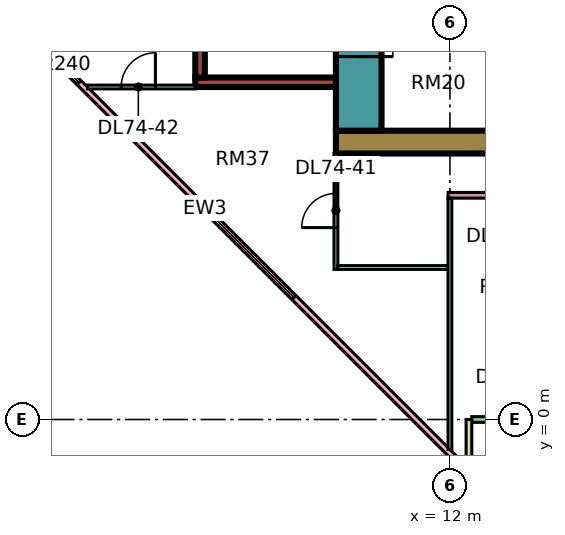
"""IFC4 building model, lengths in metres.
Left out: names, types, materials, properties, quantities, classifications, styles, units other than length and angle.
Written with IfcOpenShell. Run it as: python <this file> out.ifc"""

import sys

from ifc_helpers import new_model, si_unit, direction, frame, frame_2d, origin, place, context, subcontext, project, spatial, rectangle, extrude, element, fill, save


model = new_model("IFC4")
c1 = context("Model", 3, precision=1e-05, world=origin(), true_north=direction((0.0, 1.0)))
c2 = subcontext(c1, "Body", "Model", "MODEL_VIEW")
j1 = project(units=[si_unit("LENGTHUNIT", "METRE"), si_unit("PLANEANGLEUNIT", "RADIAN")], contexts=[c1])
p1 = place(None, origin())
s1 = spatial("IfcSite", under=j1, at=p1, CompositionType="ELEMENT")
p2 = place(p1, origin())
s2 = spatial("IfcBuilding", under=s1, at=p2, CompositionType="ELEMENT")
p3 = place(p2, frame((0.0, 0.0, 314.65)))
s3 = spatial("IfcBuildingStorey", under=s2, at=p3, CompositionType="ELEMENT", Elevation=314.65)
p4 = place(p3, frame((9.0, 7.3, 0.0), z_axis=(0.0, 0.0, 1.0), x_axis=(1.0, 0.0, 0.0)))
e1 = element("IfcWall", 1, at=p4, inside=s3, PredefinedType="SHEAR", context=c2, shape_type="SweptSolid", body=[
    extrude(rectangle(XDim=25.0, YDim=0.6, at=frame_2d((12.5, 0.0))), origin(), (0.0, 0.0, 1.0), 3.75),
])
p5 = place(p3, frame((9.6, 7.6, 0.0), z_axis=(0.0, 0.0, 1.0), x_axis=(0.0, 1.0, 0.0)))
e2 = element("IfcWall", 2, at=p5, inside=s3, PredefinedType="SHEAR", context=c2, shape_type="SweptSolid", body=[
    extrude(rectangle(XDim=11.8, YDim=1.2, at=frame_2d((5.9, 0.0))), origin(), (0.0, 0.0, 1.0), 3.75),
])
p6 = place(p5, frame((4.275, 0.0, 0.0)))
e3 = element("IfcOpeningElement", 3, at=p6, cuts=e2, PredefinedType="OPENING", context=c2, shape_type="SweptSolid", body=[
    extrude(rectangle(XDim=1.1, YDim=2.2, at=frame_2d((0.55, 1.1))), frame((0.0, 0.61, 0.0), z_axis=(0.0, -1.0, 0.0), x_axis=(1.0, 0.0, 0.0)), (0.0, 0.0, 1.0), 1.22),
])
p7 = place(p5, frame((6.775, 0.0, 0.0)))
e4 = element("IfcOpeningElement", 4, at=p7, cuts=e2, PredefinedType="OPENING", context=c2, shape_type="SweptSolid", body=[
    extrude(rectangle(XDim=1.1, YDim=2.2, at=frame_2d((0.55, 1.1))), frame((0.0, 0.61, 0.0), z_axis=(0.0, -1.0, 0.0), x_axis=(1.0, 0.0, 0.0)), (0.0, 0.0, 1.0), 1.22),
])
p8 = place(p5, frame((9.7, 0.0, 0.0)))
e5 = element("IfcOpeningElement", 5, at=p8, cuts=e2, PredefinedType="OPENING", context=c2, shape_type="SweptSolid", body=[
    extrude(rectangle(XDim=1.1, YDim=2.2, at=frame_2d((0.55, 1.1))), frame((0.0, 0.61, 0.0), z_axis=(0.0, -1.0, 0.0), x_axis=(1.0, 0.0, 0.0)), (0.0, 0.0, 1.0), 1.22),
])
p9 = place(p5, frame((1.95, 0.0, 0.0)))
e6 = element("IfcOpeningElement", 6, at=p9, cuts=e2, PredefinedType="OPENING", context=c2, shape_type="SweptSolid", body=[
    extrude(rectangle(XDim=0.9, YDim=2.1, at=frame_2d((0.45, 1.05))), frame((0.0, 0.61, 0.0), z_axis=(0.0, -1.0, 0.0), x_axis=(1.0, 0.0, 0.0)), (0.0, 0.0, 1.0), 1.22),
])
p10 = place(p3, frame((5.3, 8.875, 0.0), z_axis=(0.0, 0.0, 1.0), x_axis=(1.0, 0.0, 0.0)))
e7 = element("IfcWall", 7, at=p10, inside=s3, PredefinedType="SHEAR", context=c2, shape_type="SweptSolid", body=[
    extrude(rectangle(XDim=3.7, YDim=0.25, at=frame_2d((1.85, 0.0))), origin(), (0.0, 0.0, 1.0), 3.75),
])
p11 = place(p3, frame((5.425, 9.0, 0.0), z_axis=(0.0, 0.0, 1.0), x_axis=(0.0, 1.0, 0.0)))
e8 = element("IfcWall", 8, at=p11, inside=s3, PredefinedType="SHEAR", context=c2, shape_type="SweptSolid", body=[
    extrude(rectangle(XDim=4.0, YDim=0.25, at=frame_2d((2.0, 0.0))), origin(), (0.0, 0.0, 1.0), 3.75),
])
p12 = place(p3, frame((-1.447, 12.553, 0.0), z_axis=(0.0, 0.0, 1.0), x_axis=(0.707106781187, -0.707106781187, 0.0)))
e9 = element("IfcWall", 9, at=p12, inside=s3, PredefinedType="SOLIDWALL", context=c2, shape_type="SweptSolid", body=[
    extrude(rectangle(XDim=19.799, YDim=0.15, at=frame_2d((9.899, 0.0))), origin(), (0.0, 0.0, 1.0), 3.35),
])
p13 = place(p12, frame((2.212, 0.0, 0.45)))
e10 = element("IfcOpeningElement", 10, at=p13, cuts=e9, PredefinedType="OPENING", context=c2, shape_type="SweptSolid", body=[
    extrude(rectangle(XDim=3.0, YDim=2.4, at=frame_2d((1.5, 1.2))), frame((0.0, 0.085, 0.0), z_axis=(0.0, -1.0, 0.0), x_axis=(1.0, 0.0, 0.0)), (0.0, 0.0, 1.0), 0.17),
])
p14 = place(p12, frame((10.216, 0.0, 0.45)))
e11 = element("IfcOpeningElement", 11, at=p14, cuts=e9, PredefinedType="OPENING", context=c2, shape_type="SweptSolid", body=[
    extrude(rectangle(XDim=3.0, YDim=2.4, at=frame_2d((1.5, 1.2))), frame((0.0, 0.085, 0.0), z_axis=(0.0, -1.0, 0.0), x_axis=(1.0, 0.0, 0.0)), (0.0, 0.0, 1.0), 0.17),
])
p15 = place(p3, frame((12.575, 0.0, 0.0), z_axis=(0.0, 0.0, 1.0), x_axis=(1.0, 0.0, 0.0)))
e12 = element("IfcWall", 12, at=p15, inside=s3, PredefinedType="SOLIDWALL", context=c2, shape_type="SweptSolid", body=[
    extrude(rectangle(XDim=11.35, YDim=0.15, at=frame_2d((5.675, 0.0))), origin(), (0.0, 0.0, 1.0), 3.35),
])
p16 = place(p15, frame((0.613, 0.0, 0.0)))
e13 = element("IfcOpeningElement", 13, at=p16, cuts=e12, PredefinedType="OPENING", context=c2, shape_type="SweptSolid", body=[
    extrude(rectangle(XDim=1.2, YDim=2.4, at=frame_2d((0.6, 1.2))), frame((0.0, 0.085, 0.0), z_axis=(0.0, -1.0, 0.0), x_axis=(1.0, 0.0, 0.0)), (0.0, 0.0, 1.0), 0.17),
])
p17 = place(p15, frame((3.025, 0.0, 0.45)))
e14 = element("IfcOpeningElement", 14, at=p17, cuts=e12, PredefinedType="OPENING", context=c2, shape_type="SweptSolid", body=[
    extrude(rectangle(XDim=1.8, YDim=2.4, at=frame_2d((0.9, 1.2))), frame((0.0, 0.085, 0.0), z_axis=(0.0, -1.0, 0.0), x_axis=(1.0, 0.0, 0.0)), (0.0, 0.0, 1.0), 0.17),
])
p18 = place(p15, frame((6.675, 0.0, 0.45)))
e15 = element("IfcOpeningElement", 15, at=p18, cuts=e12, PredefinedType="OPENING", context=c2, shape_type="SweptSolid", body=[
    extrude(rectangle(XDim=3.0, YDim=2.4, at=frame_2d((1.5, 1.2))), frame((0.0, 0.085, 0.0), z_axis=(0.0, -1.0, 0.0), x_axis=(1.0, 0.0, 0.0)), (0.0, 0.0, 1.0), 0.17),
])
p19 = place(p3, frame((12.5, -1.5, 0.0), z_axis=(0.0, 0.0, 1.0), x_axis=(0.0, 1.0, 0.0)))
e16 = element("IfcWall", 16, at=p19, inside=s3, PredefinedType="SOLIDWALL", context=c2, shape_type="SweptSolid", body=[
    extrude(rectangle(XDim=1.5, YDim=0.15, at=frame_2d((0.75, 0.0))), origin(), (0.0, 0.0, 1.0), 3.35),
])
p20 = place(p3, frame((2.461, 8.75, 0.0), z_axis=(0.0, 0.0, 1.0), x_axis=(1.0, 0.0, 0.0)))
e17 = element("IfcWall", 17, at=p20, inside=s3, PredefinedType="PARTITIONING", context=c2, shape_type="SweptSolid", body=[
    extrude(rectangle(XDim=2.839, YDim=0.1, at=frame_2d((1.419, 0.0))), origin(), (0.0, 0.0, 1.0), 3.35),
])
p21 = place(p20, frame((0.889, 0.0, 0.0)))
e18 = element("IfcOpeningElement", 18, at=p21, cuts=e17, PredefinedType="OPENING", context=c2, shape_type="SweptSolid", body=[
    extrude(rectangle(XDim=0.9, YDim=2.1, at=frame_2d((0.45, 1.05))), frame((0.0, 0.06, 0.0), z_axis=(0.0, -1.0, 0.0), x_axis=(1.0, 0.0, 0.0)), (0.0, 0.0, 1.0), 0.12),
])
p22 = place(p3, frame((9.0, 3.95, 0.0), z_axis=(0.0, 0.0, 1.0), x_axis=(0.0, 1.0, 0.0)))
e19 = element("IfcWall", 19, at=p22, inside=s3, PredefinedType="PARTITIONING", context=c2, shape_type="SweptSolid", body=[
    extrude(rectangle(XDim=3.05, YDim=0.1, at=frame_2d((1.525, 0.0))), origin(), (0.0, 0.0, 1.0), 3.35),
])
p23 = place(p22, frame((1.1, 0.0, 0.0)))
e20 = element("IfcOpeningElement", 20, at=p23, cuts=e19, PredefinedType="OPENING", context=c2, shape_type="SweptSolid", body=[
    extrude(rectangle(XDim=0.9, YDim=2.1, at=frame_2d((0.45, 1.05))), frame((0.0, 0.06, 0.0), z_axis=(0.0, -1.0, 0.0), x_axis=(1.0, 0.0, 0.0)), (0.0, 0.0, 1.0), 0.12),
])
p24 = place(p3, frame((9.05, 4.0, 0.0), z_axis=(0.0, 0.0, 1.0), x_axis=(1.0, 0.0, 0.0)))
e21 = element("IfcWall", 21, at=p24, inside=s3, PredefinedType="PARTITIONING", context=c2, shape_type="SweptSolid", body=[
    extrude(rectangle(XDim=2.9, YDim=0.1, at=frame_2d((1.45, 0.0))), origin(), (0.0, 0.0, 1.0), 3.35),
])
p25 = place(p3, frame((11.95, 5.9, 0.0), z_axis=(0.0, 0.0, 1.0), x_axis=(1.0, 0.0, 0.0)))
e22 = element("IfcWall", 22, at=p25, inside=s3, PredefinedType="PARTITIONING", context=c2, shape_type="SweptSolid", body=[
    extrude(rectangle(XDim=21.1, YDim=0.15, at=frame_2d((10.55, 0.0))), origin(), (0.0, 0.0, 1.0), 3.35),
])
p26 = place(p25, frame((1.1, 0.0, 0.0)))
e23 = element("IfcOpeningElement", 23, at=p26, cuts=e22, PredefinedType="OPENING", context=c2, shape_type="SweptSolid", body=[
    extrude(rectangle(XDim=0.9, YDim=2.1, at=frame_2d((0.45, 1.05))), frame((0.0, 0.085, 0.0), z_axis=(0.0, -1.0, 0.0), x_axis=(1.0, 0.0, 0.0)), (0.0, 0.0, 1.0), 0.17),
])
p27 = place(p25, frame((4.1, 0.0, 0.0)))
e24 = element("IfcOpeningElement", 24, at=p27, cuts=e22, PredefinedType="OPENING", context=c2, shape_type="SweptSolid", body=[
    extrude(rectangle(XDim=0.9, YDim=2.1, at=frame_2d((0.45, 1.05))), frame((0.0, 0.085, 0.0), z_axis=(0.0, -1.0, 0.0), x_axis=(1.0, 0.0, 0.0)), (0.0, 0.0, 1.0), 0.17),
])
p28 = place(p25, frame((10.1, 0.0, 0.0)))
e25 = element("IfcOpeningElement", 25, at=p28, cuts=e22, PredefinedType="OPENING", context=c2, shape_type="SweptSolid", body=[
    extrude(rectangle(XDim=0.9, YDim=2.1, at=frame_2d((0.45, 1.05))), frame((0.0, 0.085, 0.0), z_axis=(0.0, -1.0, 0.0), x_axis=(1.0, 0.0, 0.0)), (0.0, 0.0, 1.0), 0.17),
])
p29 = place(p25, frame((16.1, 0.0, 0.0)))
e26 = element("IfcOpeningElement", 26, at=p29, cuts=e22, PredefinedType="OPENING", context=c2, shape_type="SweptSolid", body=[
    extrude(rectangle(XDim=0.9, YDim=2.1, at=frame_2d((0.45, 1.05))), frame((0.0, 0.085, 0.0), z_axis=(0.0, -1.0, 0.0), x_axis=(1.0, 0.0, 0.0)), (0.0, 0.0, 1.0), 0.17),
])
p30 = place(p3, frame((12.0, -0.788, 0.0), z_axis=(0.0, 0.0, 1.0), x_axis=(0.0, 1.0, 0.0)))
e27 = element("IfcWall", 27, at=p30, inside=s3, PredefinedType="PARTITIONING", context=c2, shape_type="SweptSolid", body=[
    extrude(rectangle(XDim=6.613, YDim=0.1, at=frame_2d((3.306, 0.0))), origin(), (0.0, 0.0, 1.0), 3.35),
])
p31 = place(p13, origin())
e28 = element("IfcWindow", 28, at=p31, inside=s3, PartitioningType="SINGLE_PANEL", PredefinedType="WINDOW", context=c2, shape_type="SweptSolid", body=[
    extrude(rectangle(XDim=3.0, YDim=2.4, at=frame_2d((1.5, 1.2))), frame((0.0, 0.03, 0.0), z_axis=(0.0, -1.0, 0.0), x_axis=(1.0, 0.0, 0.0)), (0.0, 0.0, 1.0), 0.06),
])
fill(e10, e28)
p32 = place(p14, origin())
e29 = element("IfcWindow", 29, at=p32, inside=s3, PartitioningType="SINGLE_PANEL", PredefinedType="WINDOW", context=c2, shape_type="SweptSolid", body=[
    extrude(rectangle(XDim=3.0, YDim=2.4, at=frame_2d((1.5, 1.2))), frame((0.0, 0.03, 0.0), z_axis=(0.0, -1.0, 0.0), x_axis=(1.0, 0.0, 0.0)), (0.0, 0.0, 1.0), 0.06),
])
fill(e11, e29)
p33 = place(p9, frame((0.9, 0.0, 0.0), z_axis=(0.0, 0.0, 1.0), x_axis=(-1.0, 0.0, 0.0)))
e30 = element("IfcDoor", 30, at=p33, inside=s3, OperationType="SINGLE_SWING_LEFT", PredefinedType="DOOR", context=c2, shape_type="SweptSolid", body=[
    extrude(rectangle(XDim=0.9, YDim=2.1, at=frame_2d((0.45, 1.05))), frame((0.0, 0.025, 0.0), z_axis=(0.0, -1.0, 0.0), x_axis=(1.0, 0.0, 0.0)), (0.0, 0.0, 1.0), 0.05),
])
fill(e6, e30)
p34 = place(p23, origin())
e31 = element("IfcDoor", 31, at=p34, inside=s3, OperationType="SINGLE_SWING_LEFT", PredefinedType="DOOR", context=c2, shape_type="SweptSolid", body=[
    extrude(rectangle(XDim=0.9, YDim=2.1, at=frame_2d((0.45, 1.05))), frame((0.0, 0.025, 0.0), z_axis=(0.0, -1.0, 0.0), x_axis=(1.0, 0.0, 0.0)), (0.0, 0.0, 1.0), 0.05),
])
fill(e20, e31)
p35 = place(p21, frame((0.9, 0.0, 0.0), z_axis=(0.0, 0.0, 1.0), x_axis=(-1.0, 0.0, 0.0)))
e32 = element("IfcDoor", 32, at=p35, inside=s3, OperationType="SINGLE_SWING_RIGHT", PredefinedType="DOOR", context=c2, shape_type="SweptSolid", body=[
    extrude(rectangle(XDim=0.9, YDim=2.1, at=frame_2d((0.45, 1.05))), frame((0.0, 0.025, 0.0), z_axis=(0.0, -1.0, 0.0), x_axis=(1.0, 0.0, 0.0)), (0.0, 0.0, 1.0), 0.05),
])
fill(e18, e32)
save(model, sys.argv[1])
